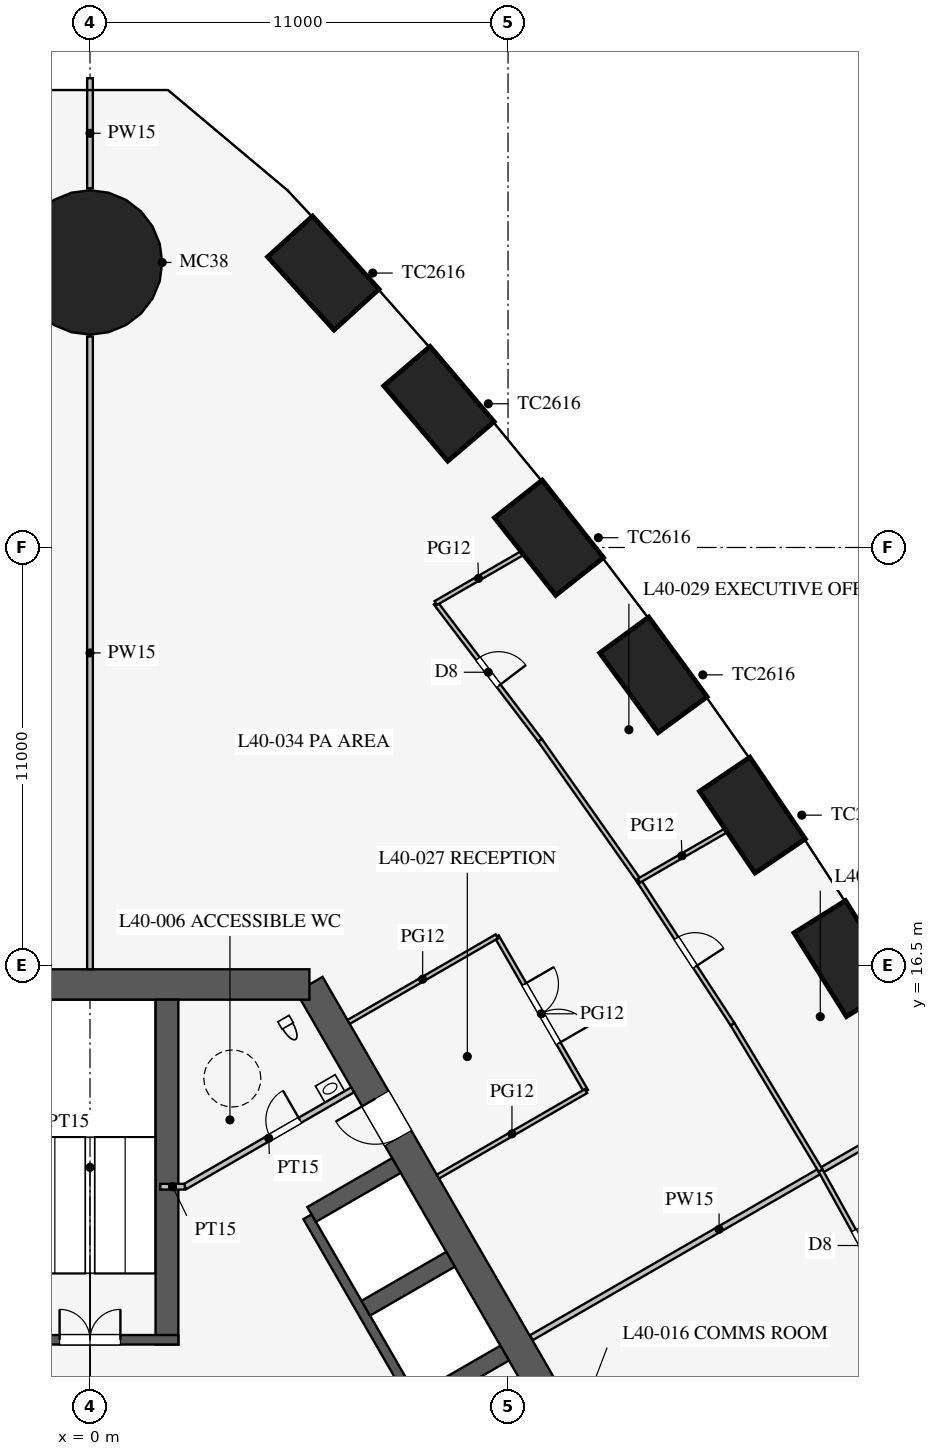
"""IFC4 building model, lengths in metres.
Left out: names, types, materials, properties, quantities, classifications, styles, units other than length and angle.
Written with IfcOpenShell. Run it as: python <this file> out.ifc"""

import sys

from ifc_helpers import new_model, si_unit, direction, frame, frame_2d, origin, origin_2d, place, context, subcontext, project, spatial, rectangle, circle, extrude, element, fill, save


model = new_model("IFC4")
c1 = context("Model", 3, precision=1e-05, world=origin(), true_north=direction((0.0, 1.0)))
c2 = subcontext(c1, "Body", "Model", "MODEL_VIEW")
j1 = project(units=[si_unit("LENGTHUNIT", "METRE"), si_unit("PLANEANGLEUNIT", "RADIAN")], contexts=[c1])
p1 = place(None, origin())
s1 = spatial("IfcSite", under=j1, at=p1, CompositionType="ELEMENT")
p2 = place(p1, origin())
s2 = spatial("IfcBuilding", under=s1, at=p2, CompositionType="ELEMENT")
p3 = place(p2, frame((0.0, 0.0, 174.5)))
s3 = spatial("IfcBuildingStorey", under=s2, at=p3, CompositionType="ELEMENT", Elevation=174.5)
for number, where, z_axis, x_axis in (
    (1, (19.893, 16.681, 0.0), (0.0, 0.0, 1.0), (-0.531, 0.847, 0.0)),
    (2, (17.43, 20.456, 0.0), (0.0, 0.0, 1.0), (-0.561, 0.828, 0.0)),
    (3, (14.825, 24.148, 0.0), (0.0, 0.0, 1.0), (-0.591, 0.807, 0.0)),
    (4, (12.077, 27.757, 0.0), (0.0, 0.0, 1.0), (-0.62, 0.785, 0.0)),
    (5, (9.182, 31.282, 0.0), (0.0, 0.0, 1.0), (-0.648, 0.762, 0.0)),
    (6, (6.139, 34.721, 0.0), (0.0, 0.0, 1.0), (-0.672, 0.74, 0.0)),
):
    element("IfcColumn", number, at=place(p3, frame(where, z_axis=z_axis, x_axis=x_axis)), inside=s3, PredefinedType="COLUMN", context=c2, shape_type="SweptSolid", body=[
        extrude(rectangle(XDim=2.6, YDim=1.6, at=origin_2d()), origin(), (0.0, 0.0, 1.0), 4.2),
    ])
p4 = place(p3, frame((0.0, 35.0, 0.0), z_axis=(0.0, 0.0, 1.0), x_axis=(1.0, 0.0, 0.0)))
e7 = element("IfcColumn", 7, at=p4, inside=s3, PredefinedType="COLUMN", context=c2, shape_type="SweptSolid", body=[
    extrude(circle(Radius=1.9, at=origin_2d()), origin(), (0.0, 0.0, 1.0), 4.2),
])
p5 = place(p3, frame((16.743, -3.0, 0.0), z_axis=(0.0, 0.0, 1.0), x_axis=(-0.500002442456, 0.866023993627, 0.0)))
e8 = element("IfcWall", 8, at=p5, inside=s3, PredefinedType="SHEAR", context=c2, shape_type="SweptSolid", body=[
    extrude(rectangle(XDim=21.939, YDim=0.8, at=frame_2d((10.97, 0.0))), origin(), (0.0, 0.0, 1.0), 4.2),
])
p6 = place(p5, frame((17.27, 0.0, 0.0)))
e9 = element("IfcOpeningElement", 9, at=p6, cuts=e8, PredefinedType="OPENING", context=c2, shape_type="SweptSolid", body=[
    extrude(rectangle(XDim=1.2, YDim=2.1, at=frame_2d((0.6, 1.05))), frame((0.0, 0.41, 0.0), z_axis=(0.0, -1.0, 0.0), x_axis=(1.0, 0.0, 0.0)), (0.0, 0.0, 1.0), 0.82),
])
p7 = place(p5, frame((3.47, 0.0, 0.0)))
e10 = element("IfcOpeningElement", 10, at=p7, cuts=e8, PredefinedType="OPENING", context=c2, shape_type="SweptSolid", body=[
    extrude(rectangle(XDim=1.2, YDim=2.1, at=frame_2d((0.6, 1.05))), frame((0.0, 0.41, 0.0), z_axis=(0.0, -1.0, 0.0), x_axis=(1.0, 0.0, 0.0)), (0.0, 0.0, 1.0), 0.82),
])
p8 = place(p3, frame((5.773, 16.0, 0.0), z_axis=(0.0, 0.0, 1.0), x_axis=(-1.0, 0.0, 0.0)))
e11 = element("IfcWall", 11, at=p8, inside=s3, PredefinedType="SHEAR", context=c2, shape_type="SweptSolid", body=[
    extrude(rectangle(XDim=11.547, YDim=0.8, at=frame_2d((5.773, 0.0))), origin(), (0.0, 0.0, 1.0), 4.2),
])
p9 = place(p3, frame((11.424, 0.014, 0.0), z_axis=(0.0, 0.0, 1.0), x_axis=(-0.500001763848, 0.866024385424, 0.0)))
e12 = element("IfcWall", 12, at=p9, inside=s3, PredefinedType="SHEAR", context=c2, shape_type="SweptSolid", body=[
    extrude(rectangle(XDim=11.4, YDim=0.25, at=frame_2d((5.7, 0.0))), origin(), (0.0, 0.0, 1.0), 4.2),
])
p10 = place(p9, frame((0.975, 0.0, 0.0)))
e13 = element("IfcOpeningElement", 13, at=p10, cuts=e12, PredefinedType="OPENING", context=c2, shape_type="SweptSolid", body=[
    extrude(rectangle(XDim=0.9, YDim=2.1, at=frame_2d((0.45, 1.05))), frame((0.0, 0.135, 0.0), z_axis=(0.0, -1.0, 0.0), x_axis=(1.0, 0.0, 0.0)), (0.0, 0.0, 1.0), 0.27),
])
p11 = place(p9, frame((3.825, 0.0, 0.0)))
e14 = element("IfcOpeningElement", 14, at=p11, cuts=e12, PredefinedType="OPENING", context=c2, shape_type="SweptSolid", body=[
    extrude(rectangle(XDim=0.9, YDim=2.1, at=frame_2d((0.45, 1.05))), frame((0.0, 0.135, 0.0), z_axis=(0.0, -1.0, 0.0), x_axis=(1.0, 0.0, 0.0)), (0.0, 0.0, 1.0), 0.27),
])
for number, where, z_axis, x_axis in (
    (15, (8.682, 5.012, 0.0), (0.0, 0.0, 1.0), (0.866, 0.5, 0.0)),
    (16, (7.257, 7.481, 0.0), (0.0, 0.0, 1.0), (0.866, 0.5, 0.0)),
):
    element("IfcWall", number, at=place(p3, frame(where, z_axis=z_axis, x_axis=x_axis)), inside=s3, PredefinedType="SHEAR", context=c2, shape_type="SweptSolid", body=[
        extrude(rectangle(XDim=2.575, YDim=0.45, at=frame_2d((1.288, 0.0))), origin(), (0.0, 0.0, 1.0), 4.2),
    ])
p12 = place(p3, frame((5.832, 9.949, 0.0), z_axis=(0.0, 0.0, 1.0), x_axis=(0.866029291668, 0.499993265928, 0.0)))
e17 = element("IfcWall", 17, at=p12, inside=s3, PredefinedType="SHEAR", context=c2, shape_type="SweptSolid", body=[
    extrude(rectangle(XDim=2.575, YDim=0.45, at=frame_2d((1.288, 0.0))), origin(), (0.0, 0.0, 1.0), 4.2),
])
p13 = place(p3, frame((2.025, 6.525, 0.0), z_axis=(0.0, 0.0, 1.0), x_axis=(0.0, 1.0, 0.0)))
e18 = element("IfcWall", 18, at=p13, inside=s3, PredefinedType="SHEAR", context=c2, shape_type="SweptSolid", body=[
    extrude(rectangle(XDim=9.075, YDim=0.6, at=frame_2d((4.538, 0.0))), origin(), (0.0, 0.0, 1.0), 4.2),
])
p14 = place(p3, frame((2.325, 6.65, 0.0), z_axis=(0.0, 0.0, 1.0), x_axis=(-1.0, 0.0, 0.0)))
e19 = element("IfcWall", 19, at=p14, inside=s3, PredefinedType="SHEAR", context=c2, shape_type="SweptSolid", body=[
    extrude(rectangle(XDim=4.65, YDim=0.25, at=frame_2d((2.325, 0.0))), origin(), (0.0, 0.0, 1.0), 4.2),
])
p15 = place(p14, frame((1.525, 0.0, 0.0)))
e20 = element("IfcOpeningElement", 20, at=p15, cuts=e19, PredefinedType="OPENING", context=c2, shape_type="SweptSolid", body=[
    extrude(rectangle(XDim=1.6, YDim=2.1, at=frame_2d((0.8, 1.05))), frame((0.0, 0.135, 0.0), z_axis=(0.0, -1.0, 0.0), x_axis=(1.0, 0.0, 0.0)), (0.0, 0.0, 1.0), 0.27),
])
p16 = place(p3, frame((2.495, 10.678, 0.0), z_axis=(0.0, 0.0, 1.0), x_axis=(0.86602216432, 0.500005610874, 0.0)))
e21 = element("IfcWall", 21, at=p16, inside=s3, PredefinedType="PARTITIONING", context=c2, shape_type="SweptSolid", body=[
    extrude(rectangle(XDim=5.1, YDim=0.15, at=frame_2d((2.55, 0.0))), origin(), (0.0, 0.0, 1.0), 3.95),
])
p17 = place(p16, frame((2.6, 0.0, 0.0)))
e22 = element("IfcOpeningElement", 22, at=p17, cuts=e21, PredefinedType="OPENING", context=c2, shape_type="SweptSolid", body=[
    extrude(rectangle(XDim=0.9, YDim=2.1, at=frame_2d((0.45, 1.05))), frame((0.0, 0.085, 0.0), z_axis=(0.0, -1.0, 0.0), x_axis=(1.0, 0.0, 0.0)), (0.0, 0.0, 1.0), 0.17),
])
p18 = place(p3, frame((2.495, 10.678, 0.0), z_axis=(0.0, 0.0, 1.0), x_axis=(-1.0, 0.0, 0.0)))
e23 = element("IfcWall", 23, at=p18, inside=s3, PredefinedType="PARTITIONING", context=c2, shape_type="SweptSolid", body=[
    extrude(rectangle(XDim=0.645, YDim=0.15, at=frame_2d((0.323, 0.0))), origin(), (0.0, 0.0, 1.0), 3.95),
])
p19 = place(p3, frame((0.0, 16.4, 0.0), z_axis=(0.0, 0.0, 1.0), x_axis=(0.0, 1.0, 0.0)))
e24 = element("IfcWall", 24, at=p19, inside=s3, PredefinedType="PARTITIONING", context=c2, shape_type="SweptSolid", body=[
    extrude(rectangle(XDim=16.65, YDim=0.15, at=frame_2d((8.325, 0.0))), origin(), (0.0, 0.0, 1.0), 1.95),
])
p20 = place(p3, frame((0.0, 36.95, 0.0), z_axis=(0.0, 0.0, 1.0), x_axis=(0.0, 1.0, 0.0)))
e25 = element("IfcWall", 25, at=p20, inside=s3, PredefinedType="PARTITIONING", context=c2, shape_type="SweptSolid", body=[
    extrude(rectangle(XDim=2.899, YDim=0.15, at=frame_2d((1.45, 0.0))), origin(), (0.0, 0.0, 1.0), 1.95),
])
p21 = place(p3, frame((11.613, 6.705, 0.0), z_axis=(0.0, 0.0, 1.0), x_axis=(0.866026306654, 0.499998436182, 0.0)))
e26 = element("IfcWall", 26, at=p21, inside=s3, PredefinedType="PARTITIONING", context=c2, shape_type="SweptSolid", body=[
    extrude(rectangle(XDim=11.41, YDim=0.15, at=frame_2d((5.705, 0.0))), origin(), (0.0, 0.0, 1.0), 2.15),
])
p22 = place(p3, frame((13.052, 13.194, 0.0), z_axis=(0.0, 0.0, 1.0), x_axis=(-0.499977259774, 0.866038532462, 0.0)))
e27 = element("IfcWall", 27, at=p22, inside=s3, PredefinedType="PARTITIONING", context=c2, shape_type="SweptSolid", body=[
    extrude(rectangle(XDim=4.7, YDim=0.12, at=frame_2d((2.35, 0.0))), origin(), (0.0, 0.0, 1.0), 2.9),
])
p23 = place(p22, frame((1.45, 0.0, 0.15)))
e28 = element("IfcOpeningElement", 28, at=p23, cuts=e27, PredefinedType="OPENING", context=c2, shape_type="SweptSolid", body=[
    extrude(rectangle(XDim=1.8, YDim=2.1, at=frame_2d((0.9, 1.05))), frame((0.0, 0.07, 0.0), z_axis=(0.0, -1.0, 0.0), x_axis=(1.0, 0.0, 0.0)), (0.0, 0.0, 1.0), 0.14),
])
p24 = place(p3, frame((9.155, 10.944, 0.0), z_axis=(0.0, 0.0, 1.0), x_axis=(0.866017533419, 0.500013631625, 0.0)))
e29 = element("IfcWall", 29, at=p24, inside=s3, PredefinedType="PARTITIONING", context=c2, shape_type="SweptSolid", body=[
    extrude(rectangle(XDim=4.5, YDim=0.12, at=frame_2d((2.25, 0.0))), origin(), (0.0, 0.0, 1.0), 2.9),
])
p25 = place(p3, frame((6.805, 15.014, 0.0), z_axis=(0.0, 0.0, 1.0), x_axis=(0.866031096941, 0.499990139034, 0.0)))
e30 = element("IfcWall", 30, at=p25, inside=s3, PredefinedType="PARTITIONING", context=c2, shape_type="SweptSolid", body=[
    extrude(rectangle(XDim=4.5, YDim=0.12, at=frame_2d((2.25, 0.0))), origin(), (0.0, 0.0, 1.0), 2.9),
])
p26 = place(p3, frame((19.226, 11.1, 0.0), z_axis=(0.0, 0.0, 1.0), x_axis=(-0.515548366618, 0.856860479703, 0.0)))
e31 = element("IfcWall", 31, at=p26, inside=s3, PredefinedType="PARTITIONING", context=c2, shape_type="SweptSolid", body=[
    extrude(rectangle(XDim=4.501, YDim=0.12, at=frame_2d((2.25, 0.0))), origin(), (0.0, 0.0, 1.0), 2.9),
])
p27 = place(p3, frame((11.842, 22.425, 0.0), z_axis=(0.0, 0.0, 1.0), x_axis=(-0.605240194184, 0.796042905467, 0.0)))
e32 = element("IfcWall", 32, at=p27, inside=s3, PredefinedType="PARTITIONING", context=c2, shape_type="SweptSolid", body=[
    extrude(rectangle(XDim=4.536, YDim=0.12, at=frame_2d((2.268, 0.0))), origin(), (0.0, 0.0, 1.0), 2.9),
])
p28 = place(p27, frame((1.8, 0.0, 0.15)))
e33 = element("IfcOpeningElement", 33, at=p28, cuts=e32, PredefinedType="OPENING", context=c2, shape_type="SweptSolid", body=[
    extrude(rectangle(XDim=0.9, YDim=2.1, at=frame_2d((0.45, 1.05))), frame((0.0, 0.07, 0.0), z_axis=(0.0, -1.0, 0.0), x_axis=(1.0, 0.0, 0.0)), (0.0, 0.0, 1.0), 0.14),
])
p29 = place(p3, frame((16.905, 14.956, 0.0), z_axis=(0.0, 0.0, 1.0), x_axis=(-0.546069464151, 0.837739900161, 0.0)))
e34 = element("IfcWall", 34, at=p29, inside=s3, PredefinedType="PARTITIONING", context=c2, shape_type="SweptSolid", body=[
    extrude(rectangle(XDim=4.507, YDim=0.12, at=frame_2d((2.253, 0.0))), origin(), (0.0, 0.0, 1.0), 2.9),
])
p30 = place(p29, frame((1.8, 0.0, 0.15)))
e35 = element("IfcOpeningElement", 35, at=p30, cuts=e34, PredefinedType="OPENING", context=c2, shape_type="SweptSolid", body=[
    extrude(rectangle(XDim=0.9, YDim=2.1, at=frame_2d((0.45, 1.05))), frame((0.0, 0.07, 0.0), z_axis=(0.0, -1.0, 0.0), x_axis=(1.0, 0.0, 0.0)), (0.0, 0.0, 1.0), 0.14),
])
p31 = place(p3, frame((14.444, 18.732, 0.0), z_axis=(0.0, 0.0, 1.0), x_axis=(-0.576023283708, 0.817433285734, 0.0)))
e36 = element("IfcWall", 36, at=p31, inside=s3, PredefinedType="PARTITIONING", context=c2, shape_type="SweptSolid", body=[
    extrude(rectangle(XDim=4.519, YDim=0.12, at=frame_2d((2.259, 0.0))), origin(), (0.0, 0.0, 1.0), 2.9),
])
p32 = place(p3, frame((21.405, 7.162, 0.0), z_axis=(0.0, 0.0, 1.0), x_axis=(-0.484292898211, 0.874905931368, 0.0)))
e37 = element("IfcWall", 37, at=p32, inside=s3, PredefinedType="PARTITIONING", context=c2, shape_type="SweptSolid", body=[
    extrude(rectangle(XDim=4.501, YDim=0.12, at=frame_2d((2.25, 0.0))), origin(), (0.0, 0.0, 1.0), 2.9),
])
p33 = place(p32, frame((1.8, 0.0, 0.15)))
e38 = element("IfcOpeningElement", 38, at=p33, cuts=e37, PredefinedType="OPENING", context=c2, shape_type="SweptSolid", body=[
    extrude(rectangle(XDim=0.9, YDim=2.1, at=frame_2d((0.45, 1.05))), frame((0.0, 0.07, 0.0), z_axis=(0.0, -1.0, 0.0), x_axis=(1.0, 0.0, 0.0)), (0.0, 0.0, 1.0), 0.14),
])
p34 = place(p3, frame((9.096, 26.036, 0.0), z_axis=(0.0, 0.0, 1.0), x_axis=(0.866012205188, 0.500022859943, 0.0)))
e39 = element("IfcWall", 39, at=p34, inside=s3, PredefinedType="PARTITIONING", context=c2, shape_type="SweptSolid", body=[
    extrude(rectangle(XDim=2.603, YDim=0.12, at=frame_2d((1.302, 0.0))), origin(), (0.0, 0.0, 1.0), 2.15),
])
p35 = place(p3, frame((14.444, 18.732, 0.0), z_axis=(0.0, 0.0, 1.0), x_axis=(0.866011491631, 0.500024095782, 0.0)))
e40 = element("IfcWall", 40, at=p35, inside=s3, PredefinedType="PARTITIONING", context=c2, shape_type="SweptSolid", body=[
    extrude(rectangle(XDim=2.615, YDim=0.12, at=frame_2d((1.308, 0.0))), origin(), (0.0, 0.0, 1.0), 2.35),
])
p36 = place(p17, origin())
e41 = element("IfcDoor", 41, at=p36, inside=s3, OperationType="SINGLE_SWING_RIGHT", PredefinedType="DOOR", context=c2, shape_type="SweptSolid", body=[
    extrude(rectangle(XDim=0.9, YDim=2.1, at=frame_2d((0.45, 1.05))), frame((0.0, 0.025, 0.0), z_axis=(0.0, -1.0, 0.0), x_axis=(1.0, 0.0, 0.0)), (0.0, 0.0, 1.0), 0.05),
])
fill(e22, e41)
p37 = place(p15, frame((1.6, 0.0, 0.0), z_axis=(0.0, 0.0, 1.0), x_axis=(-1.0, 0.0, 0.0)))
e42 = element("IfcDoor", 42, at=p37, inside=s3, OperationType="DOUBLE_DOOR_SINGLE_SWING", PredefinedType="DOOR", context=c2, shape_type="SweptSolid", body=[
    extrude(rectangle(XDim=1.6, YDim=2.1, at=frame_2d((0.8, 1.05))), frame((0.0, 0.025, 0.0), z_axis=(0.0, -1.0, 0.0), x_axis=(1.0, 0.0, 0.0)), (0.0, 0.0, 1.0), 0.05),
])
fill(e20, e42)
p38 = place(p6, origin())
e43 = element("IfcDoor", 43, at=p38, inside=s3, OperationType="SINGLE_SWING_RIGHT", PredefinedType="DOOR", context=c2, shape_type="SweptSolid", body=[
    extrude(rectangle(XDim=1.2, YDim=2.1, at=frame_2d((0.6, 1.05))), frame((0.0, 0.025, 0.0), z_axis=(0.0, -1.0, 0.0), x_axis=(1.0, 0.0, 0.0)), (0.0, 0.0, 1.0), 0.05),
])
fill(e9, e43)
p39 = place(p23, frame((1.8, 0.0, 0.0), z_axis=(0.0, 0.0, 1.0), x_axis=(-1.0, 0.0, 0.0)))
e44 = element("IfcDoor", 44, at=p39, inside=s3, OperationType="DOUBLE_DOOR_SINGLE_SWING", PredefinedType="DOOR", context=c2, shape_type="SweptSolid", body=[
    extrude(rectangle(XDim=1.8, YDim=2.1, at=frame_2d((0.9, 1.05))), frame((0.0, 0.025, 0.0), z_axis=(0.0, -1.0, 0.0), x_axis=(1.0, 0.0, 0.0)), (0.0, 0.0, 1.0), 0.05),
])
fill(e28, e44)
p40 = place(p28, frame((0.9, 0.0, 0.0), z_axis=(0.0, 0.0, 1.0), x_axis=(-1.0, 0.0, 0.0)))
e45 = element("IfcDoor", 45, at=p40, inside=s3, OperationType="SINGLE_SWING_RIGHT", PredefinedType="DOOR", context=c2, shape_type="SweptSolid", body=[
    extrude(rectangle(XDim=0.9, YDim=2.1, at=frame_2d((0.45, 1.05))), frame((0.0, 0.025, 0.0), z_axis=(0.0, -1.0, 0.0), x_axis=(1.0, 0.0, 0.0)), (0.0, 0.0, 1.0), 0.05),
])
fill(e33, e45)
p41 = place(p30, frame((0.9, 0.0, 0.0), z_axis=(0.0, 0.0, 1.0), x_axis=(-1.0, 0.0, 0.0)))
e46 = element("IfcDoor", 46, at=p41, inside=s3, OperationType="SINGLE_SWING_RIGHT", PredefinedType="DOOR", context=c2, shape_type="SweptSolid", body=[
    extrude(rectangle(XDim=0.9, YDim=2.1, at=frame_2d((0.45, 1.05))), frame((0.0, 0.025, 0.0), z_axis=(0.0, -1.0, 0.0), x_axis=(1.0, 0.0, 0.0)), (0.0, 0.0, 1.0), 0.05),
])
fill(e35, e46)
p42 = place(p33, frame((0.9, 0.0, 0.0), z_axis=(0.0, 0.0, 1.0), x_axis=(-1.0, 0.0, 0.0)))
e47 = element("IfcDoor", 47, at=p42, inside=s3, OperationType="SINGLE_SWING_RIGHT", PredefinedType="DOOR", context=c2, shape_type="SweptSolid", body=[
    extrude(rectangle(XDim=0.9, YDim=2.1, at=frame_2d((0.45, 1.05))), frame((0.0, 0.025, 0.0), z_axis=(0.0, -1.0, 0.0), x_axis=(1.0, 0.0, 0.0)), (0.0, 0.0, 1.0), 0.05),
])
fill(e38, e47)
save(model, sys.argv[1])
